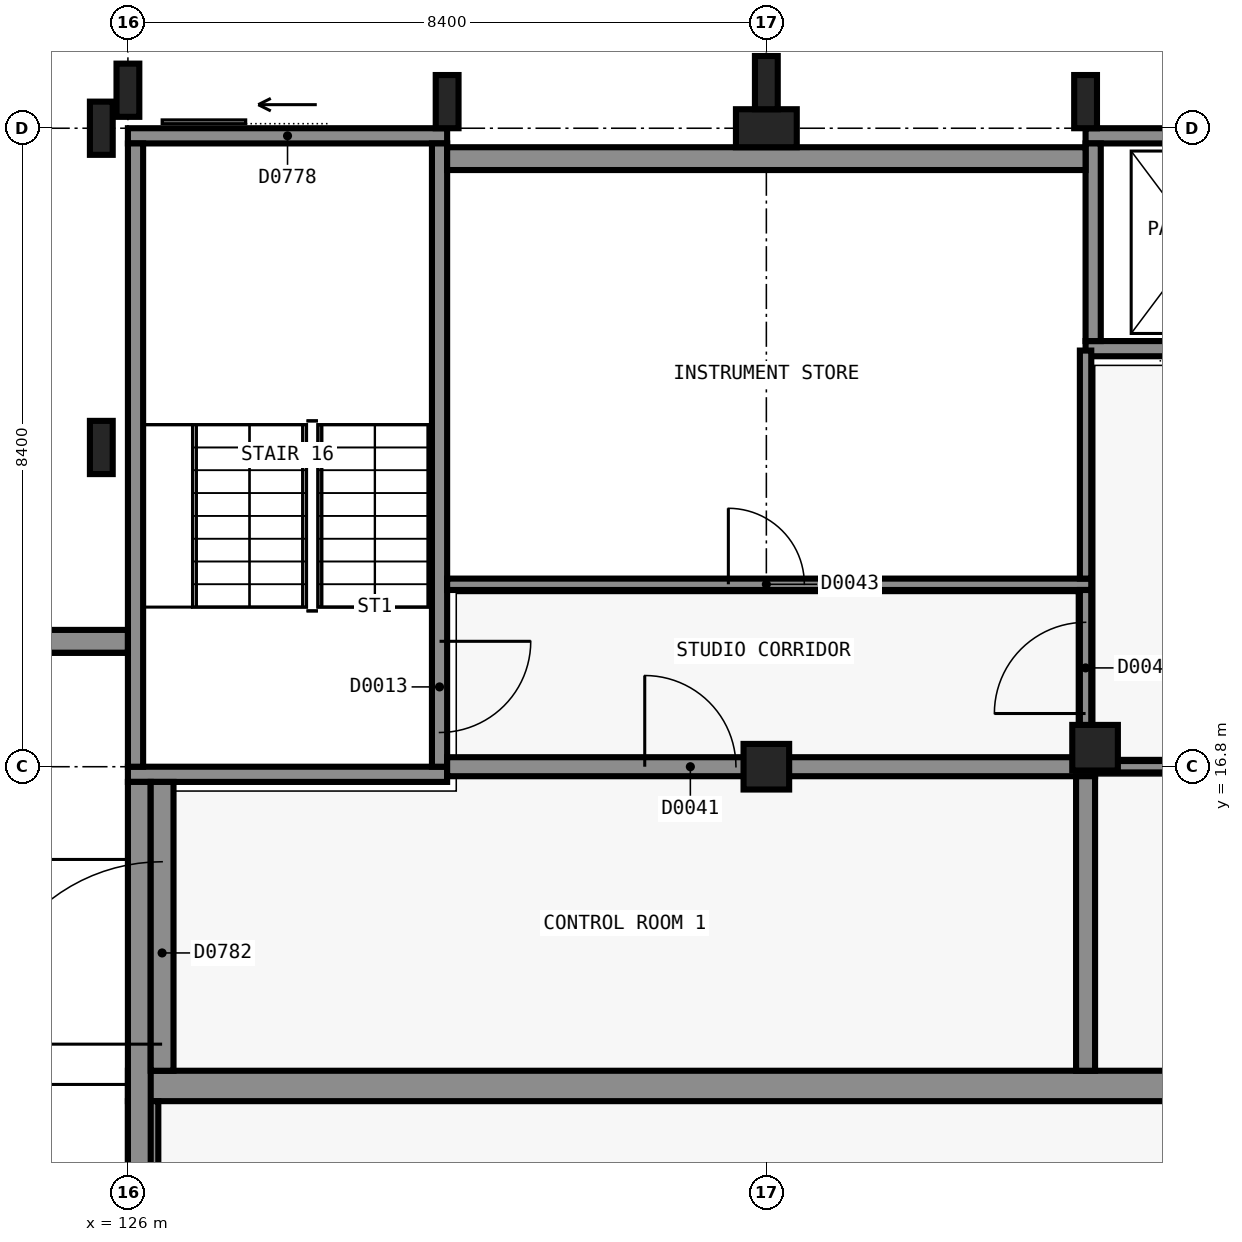
"""IFC4 building model, lengths in metres.
Left out: names, types, materials, properties, quantities, classifications, styles, units other than length and angle.
Written with IfcOpenShell. Run it as: python <this file> out.ifc"""

import sys

from ifc_helpers import new_model, si_unit, direction, frame, frame_2d, origin, origin_2d, place, context, subcontext, project, spatial, rectangle, extrude, element, fill, save


model = new_model("IFC4")
c1 = context("Model", 3, precision=1e-05, world=origin(), true_north=direction((0.0, 1.0)))
c2 = subcontext(c1, "Body", "Model", "MODEL_VIEW")
j1 = project(units=[si_unit("LENGTHUNIT", "METRE"), si_unit("PLANEANGLEUNIT", "RADIAN")], contexts=[c1])
p1 = place(None, origin())
s1 = spatial("IfcSite", under=j1, at=p1, CompositionType="ELEMENT")
p2 = place(p1, origin())
s2 = spatial("IfcBuilding", under=s1, at=p2, CompositionType="ELEMENT")
p3 = place(p2, origin())
s3 = spatial("IfcBuildingStorey", under=s2, at=p3, CompositionType="ELEMENT", Elevation=0.0)
p4 = place(p3, frame((130.2, 16.7, -0.3), z_axis=(0.0, 0.0, 1.0), x_axis=(-1.0, 0.0, 0.0)))
e1 = element("IfcWall", 1, at=p4, inside=s3, PredefinedType="SHEAR", context=c2, shape_type="SweptSolid", body=[
    extrude(rectangle(XDim=4.2, YDim=0.2, at=frame_2d((2.1, 0.0))), origin(), (0.0, 0.0, 1.0), 5.7),
])
p5 = place(p3, frame((126.0, 25.1, -0.3), z_axis=(0.0, 0.0, 1.0), x_axis=(1.0, 0.0, 0.0)))
e2 = element("IfcWall", 2, at=p5, inside=s3, PredefinedType="SHEAR", context=c2, shape_type="SweptSolid", body=[
    extrude(rectangle(XDim=4.2, YDim=0.2, at=frame_2d((2.1, 0.0))), origin(), (0.0, 0.0, 1.0), 5.7),
])
p6 = place(p5, frame((1.55, 0.0, 0.0)))
e3 = element("IfcOpeningElement", 3, at=p6, cuts=e2, PredefinedType="OPENING", context=c2, shape_type="SweptSolid", body=[
    extrude(rectangle(XDim=1.1, YDim=2.2, at=frame_2d((0.55, 1.1))), frame((0.0, 0.11, 0.0), z_axis=(0.0, -1.0, 0.0), x_axis=(1.0, 0.0, 0.0)), (0.0, 0.0, 1.0), 0.22),
])
p7 = place(p3, frame((126.1, 16.8, -0.3), z_axis=(0.0, 0.0, 1.0), x_axis=(0.0, 1.0, 0.0)))
e4 = element("IfcWall", 4, at=p7, inside=s3, PredefinedType="SHEAR", context=c2, shape_type="SweptSolid", body=[
    extrude(rectangle(XDim=8.2, YDim=0.2, at=frame_2d((4.1, 0.0))), origin(), (0.0, 0.0, 1.0), 5.7),
])
p8 = place(p3, frame((130.1, 25.0, -0.3), z_axis=(0.0, 0.0, 1.0), x_axis=(0.0, -1.0, 0.0)))
e5 = element("IfcWall", 5, at=p8, inside=s3, PredefinedType="SHEAR", context=c2, shape_type="SweptSolid", body=[
    extrude(rectangle(XDim=8.2, YDim=0.2, at=frame_2d((4.1, 0.0))), origin(), (0.0, 0.0, 1.0), 5.7),
])
p9 = place(p8, frame((6.55, 0.0, 0.3)))
e6 = element("IfcOpeningElement", 6, at=p9, cuts=e5, PredefinedType="OPENING", context=c2, shape_type="SweptSolid", body=[
    extrude(rectangle(XDim=1.2, YDim=2.1, at=frame_2d((0.6, 1.05))), frame((0.0, 0.11, 0.0), z_axis=(0.0, -1.0, 0.0), x_axis=(1.0, 0.0, 0.0)), (0.0, 0.0, 1.0), 0.22),
])
p10 = place(p3, frame((141.6, 22.3, -1.6), z_axis=(0.0, 0.0, 1.0), x_axis=(-1.0, 0.0, 0.0)))
e7 = element("IfcWall", 7, at=p10, inside=s3, PredefinedType="SHEAR", context=c2, shape_type="SweptSolid", body=[
    extrude(rectangle(XDim=3.0, YDim=0.2, at=frame_2d((1.5, 0.0))), origin(), (0.0, 0.0, 1.0), 7.0),
])
p11 = place(p10, frame((0.95, 0.0, 1.6)))
e8 = element("IfcOpeningElement", 8, at=p11, cuts=e7, PredefinedType="OPENING", context=c2, shape_type="SweptSolid", body=[
    extrude(rectangle(XDim=1.1, YDim=2.1, at=frame_2d((0.55, 1.05))), frame((0.0, 0.11, 0.0), z_axis=(0.0, -1.0, 0.0), x_axis=(1.0, 0.0, 0.0)), (0.0, 0.0, 1.0), 0.22),
])
p12 = place(p3, frame((138.6, 25.1, -1.6), z_axis=(0.0, 0.0, 1.0), x_axis=(1.0, 0.0, 0.0)))
e9 = element("IfcWall", 9, at=p12, inside=s3, PredefinedType="SHEAR", context=c2, shape_type="SweptSolid", body=[
    extrude(rectangle(XDim=3.0, YDim=0.2, at=frame_2d((1.5, 0.0))), origin(), (0.0, 0.0, 1.0), 7.0),
])
p13 = place(p3, frame((138.7, 22.4, -1.6), z_axis=(0.0, 0.0, 1.0), x_axis=(0.0, 1.0, 0.0)))
e10 = element("IfcWall", 10, at=p13, inside=s3, PredefinedType="SHEAR", context=c2, shape_type="SweptSolid", body=[
    extrude(rectangle(XDim=2.6, YDim=0.2, at=frame_2d((1.3, 0.0))), origin(), (0.0, 0.0, 1.0), 7.0),
])
p14 = place(p3, frame((126.0, 12.6, -0.3), z_axis=(0.0, 0.0, 1.0), x_axis=(1.0, 0.0, 0.0)))
e11 = element("IfcWall", 11, at=p14, inside=s3, PredefinedType="SHEAR", context=c2, shape_type="SweptSolid", body=[
    extrude(rectangle(XDim=17.0, YDim=0.4, at=frame_2d((8.5, 0.0))), origin(), (0.0, 0.0, 1.0), 5.7),
])
p15 = place(p14, frame((14.1, 0.0, 0.3)))
e12 = element("IfcOpeningElement", 12, at=p15, cuts=e11, PredefinedType="OPENING", context=c2, shape_type="SweptSolid", body=[
    extrude(rectangle(XDim=1.2, YDim=2.1, at=frame_2d((0.6, 1.05))), frame((0.0, 0.21, 0.0), z_axis=(0.0, -1.0, 0.0), x_axis=(1.0, 0.0, 0.0)), (0.0, 0.0, 1.0), 0.42),
])
p16 = place(p3, frame((126.2, 0.4, -0.3), z_axis=(0.0, 0.0, 1.0), x_axis=(0.0, 1.0, 0.0)))
e13 = element("IfcWall", 13, at=p16, inside=s3, PredefinedType="SHEAR", context=c2, shape_type="SweptSolid", body=[
    extrude(rectangle(XDim=12.0, YDim=0.4, at=frame_2d((6.0, 0.0))), origin(), (0.0, 0.0, 1.0), 5.7),
])
p17 = place(p3, frame((134.4, 16.8, -0.3), z_axis=(0.0, 0.0, 1.0), x_axis=(1.0, 0.0, 0.0)))
e14 = element("IfcColumn", 14, at=p17, inside=s3, PredefinedType="COLUMN", context=c2, shape_type="SweptSolid", body=[
    extrude(rectangle(XDim=0.6, YDim=0.6, at=origin_2d()), origin(), (0.0, 0.0, 1.0), 5.7),
])
p18 = place(p3, frame((134.4, 25.2, -0.3), z_axis=(0.0, 0.0, 1.0), x_axis=(1.0, 0.0, 0.0)))
e15 = element("IfcColumn", 15, at=p18, inside=s3, PredefinedType="COLUMN", context=c2, shape_type="SweptSolid", body=[
    extrude(rectangle(XDim=0.8, YDim=0.5, at=origin_2d()), origin(), (0.0, 0.0, 1.0), 5.7),
])
p19 = place(p3, frame((138.725, 17.05, -0.3), z_axis=(0.0, 0.0, 1.0), x_axis=(1.0, 0.0, 0.0)))
e16 = element("IfcColumn", 16, at=p19, inside=s3, PredefinedType="COLUMN", context=c2, shape_type="SweptSolid", body=[
    extrude(rectangle(XDim=0.6, YDim=0.6, at=origin_2d()), origin(), (0.0, 0.0, 1.0), 5.7),
])
p20 = place(p3, frame((125.999, 18.45, -1.2), z_axis=(0.0, 0.0, 1.0), x_axis=(-1.0, 0.0, 0.0)))
e17 = element("IfcWall", 17, at=p20, inside=s3, PredefinedType="SOLIDWALL", context=c2, shape_type="SweptSolid", body=[
    extrude(rectangle(XDim=6.499, YDim=0.3, at=frame_2d((3.25, 0.0))), origin(), (0.0, 0.0, 1.0), 0.9),
])
p21 = place(p3, frame((126.15, 10.3, -1.2), z_axis=(0.0, 0.0, 1.0), x_axis=(0.0, 1.0, 0.0)))
e18 = element("IfcWall", 18, at=p21, inside=s3, PredefinedType="SOLIDWALL", context=c2, shape_type="SweptSolid", body=[
    extrude(rectangle(XDim=6.3, YDim=0.3, at=frame_2d((3.15, 0.0))), origin(), (0.0, 0.0, 1.0), 0.9),
])
p22 = place(p3, frame((130.2, 24.8, 0.0), z_axis=(0.0, 0.0, 1.0), x_axis=(1.0, 0.0, 0.0)))
e19 = element("IfcWall", 19, at=p22, inside=s3, PredefinedType="SOLIDWALL", context=c2, shape_type="SweptSolid", body=[
    extrude(rectangle(XDim=8.4, YDim=0.3, at=frame_2d((4.2, 0.0))), origin(), (0.0, 0.0, 1.0), 5.1),
])
for number, where, z_axis, x_axis in (
    (20, (126.0, 25.7, -0.3), (0.0, 0.0, 1.0), (1.0, 0.0, 0.0)),
    (21, (130.2, 25.55, -0.3), (0.0, 0.0, 1.0), (1.0, 0.0, 0.0)),
    (22, (134.4, 25.8, -0.3), (0.0, 0.0, 1.0), (1.0, 0.0, 0.0)),
    (23, (138.6, 25.55, -0.3), (0.0, 0.0, 1.0), (1.0, 0.0, 0.0)),
):
    element("IfcColumn", number, at=place(p3, frame(where, z_axis=z_axis, x_axis=x_axis)), inside=s3, PredefinedType="PILASTER", context=c2, shape_type="SweptSolid", body=[
        extrude(rectangle(XDim=0.3, YDim=0.7, at=origin_2d()), origin(), (0.0, 0.0, 1.0), 5.7),
    ])
p23 = place(p3, frame((126.45, 12.8, 0.0), z_axis=(0.0, 0.0, 1.0), x_axis=(0.0, 1.0, 0.0)))
e24 = element("IfcWall", 24, at=p23, inside=s3, PredefinedType="SOLIDWALL", context=c2, shape_type="SweptSolid", body=[
    extrude(rectangle(XDim=3.8, YDim=0.3, at=frame_2d((1.9, 0.0))), origin(), (0.0, 0.0, 1.0), 5.1),
])
p24 = place(p23, frame((0.35, 0.0, 0.0)))
e25 = element("IfcOpeningElement", 25, at=p24, cuts=e24, PredefinedType="OPENING", context=c2, shape_type="SweptSolid", body=[
    extrude(rectangle(XDim=2.4, YDim=2.4, at=frame_2d((1.2, 1.2))), frame((0.0, 0.16, 0.0), z_axis=(0.0, -1.0, 0.0), x_axis=(1.0, 0.0, 0.0)), (0.0, 0.0, 1.0), 0.32),
])
for number, where, z_axis, x_axis in (
    (26, (125.65, 21.0, -0.3), (0.0, 0.0, 1.0), (0.0, 1.0, 0.0)),
    (27, (125.65, 25.2, -0.3), (0.0, 0.0, 1.0), (0.0, 1.0, 0.0)),
):
    element("IfcColumn", number, at=place(p3, frame(where, z_axis=z_axis, x_axis=x_axis)), inside=s3, PredefinedType="PILASTER", context=c2, shape_type="SweptSolid", body=[
        extrude(rectangle(XDim=0.3, YDim=0.7, at=origin_2d()), origin(), (0.0, 0.0, 1.0), 5.7),
    ])
p25 = place(p3, frame((130.2, 16.8, 0.0), z_axis=(0.0, 0.0, 1.0), x_axis=(1.0, 0.0, 0.0)))
e28 = element("IfcWall", 28, at=p25, inside=s3, PredefinedType="PARTITIONING", context=c2, shape_type="SweptSolid", body=[
    extrude(rectangle(XDim=8.525, YDim=0.25, at=frame_2d((4.263, 0.0))), origin(), (0.0, 0.0, 1.0), 4.4),
])
p26 = place(p25, frame((2.6, 0.0, 0.0)))
e29 = element("IfcOpeningElement", 29, at=p26, cuts=e28, PredefinedType="OPENING", context=c2, shape_type="SweptSolid", body=[
    extrude(rectangle(XDim=1.2, YDim=2.1, at=frame_2d((0.6, 1.05))), frame((0.0, 0.135, 0.0), z_axis=(0.0, -1.0, 0.0), x_axis=(1.0, 0.0, 0.0)), (0.0, 0.0, 1.0), 0.27),
])
p27 = place(p3, frame((138.6, 12.8, 0.0), z_axis=(0.0, 0.0, 1.0), x_axis=(0.0, 1.0, 0.0)))
e30 = element("IfcWall", 30, at=p27, inside=s3, PredefinedType="PARTITIONING", context=c2, shape_type="SweptSolid", body=[
    extrude(rectangle(XDim=3.875, YDim=0.25, at=frame_2d((1.938, 0.0))), origin(), (0.0, 0.0, 1.0), 4.4),
])
p28 = place(p3, frame((130.2, 19.2, 0.0), z_axis=(0.0, 0.0, 1.0), x_axis=(1.0, 0.0, 0.0)))
e31 = element("IfcWall", 31, at=p28, inside=s3, PredefinedType="PARTITIONING", context=c2, shape_type="SweptSolid", body=[
    extrude(rectangle(XDim=8.475, YDim=0.15, at=frame_2d((4.237, 0.0))), origin(), (0.0, 0.0, 1.0), 4.4),
])
p29 = place(p28, frame((3.7, 0.0, 0.0)))
e32 = element("IfcOpeningElement", 32, at=p29, cuts=e31, PredefinedType="OPENING", context=c2, shape_type="SweptSolid", body=[
    extrude(rectangle(XDim=1.0, YDim=2.1, at=frame_2d((0.5, 1.05))), frame((0.0, 0.085, 0.0), z_axis=(0.0, -1.0, 0.0), x_axis=(1.0, 0.0, 0.0)), (0.0, 0.0, 1.0), 0.17),
])
p30 = place(p3, frame((138.725, 16.8, 0.0), z_axis=(0.0, 0.0, 1.0), x_axis=(1.0, 0.0, 0.0)))
e33 = element("IfcWall", 33, at=p30, inside=s3, PredefinedType="SOLIDWALL", context=c2, shape_type="SweptSolid", body=[
    extrude(rectangle(XDim=6.95, YDim=0.15, at=frame_2d((3.475, 0.0))), origin(), (0.0, 0.0, 1.0), 4.4),
])
p31 = place(p30, frame((2.475, 0.0, 0.0)))
e34 = element("IfcOpeningElement", 34, at=p31, cuts=e33, PredefinedType="OPENING", context=c2, shape_type="SweptSolid", body=[
    extrude(rectangle(XDim=1.2, YDim=2.1, at=frame_2d((0.6, 1.05))), frame((0.0, 0.085, 0.0), z_axis=(0.0, -1.0, 0.0), x_axis=(1.0, 0.0, 0.0)), (0.0, 0.0, 1.0), 0.17),
])
p32 = place(p3, frame((138.6, 16.925, 0.0), z_axis=(0.0, 0.0, 1.0), x_axis=(0.0, 1.0, 0.0)))
e35 = element("IfcWall", 35, at=p32, inside=s3, PredefinedType="SOLIDWALL", context=c2, shape_type="SweptSolid", body=[
    extrude(rectangle(XDim=2.2, YDim=0.15, at=frame_2d((1.1, 0.0))), origin(), (0.0, 0.0, 1.0), 4.4),
])
p33 = place(p32, frame((0.575, 0.0, 0.0)))
e36 = element("IfcOpeningElement", 36, at=p33, cuts=e35, PredefinedType="OPENING", context=c2, shape_type="SweptSolid", body=[
    extrude(rectangle(XDim=1.2, YDim=2.1, at=frame_2d((0.6, 1.05))), frame((0.0, 0.085, 0.0), z_axis=(0.0, -1.0, 0.0), x_axis=(1.0, 0.0, 0.0)), (0.0, 0.0, 1.0), 0.17),
])
p34 = place(p3, frame((138.6, 19.275, 0.0), z_axis=(0.0, 0.0, 1.0), x_axis=(0.0, 1.0, 0.0)))
e37 = element("IfcWall", 37, at=p34, inside=s3, PredefinedType="SOLIDWALL", context=c2, shape_type="SweptSolid", body=[
    extrude(rectangle(XDim=3.0, YDim=0.15, at=frame_2d((1.5, 0.0))), origin(), (0.0, 0.0, 1.0), 5.1),
])
p35 = place(p6, origin())
e38 = element("IfcDoor", 38, at=p35, inside=s3, OperationType="SLIDING_TO_LEFT", PredefinedType="DOOR", context=c2, shape_type="SweptSolid", body=[
    extrude(rectangle(XDim=1.1, YDim=2.2, at=frame_2d((0.55, 1.1))), frame((0.0, 0.025, 0.0), z_axis=(0.0, -1.0, 0.0), x_axis=(1.0, 0.0, 0.0)), (0.0, 0.0, 1.0), 0.05),
])
fill(e3, e38)
p36 = place(p24, origin())
e39 = element("IfcDoor", 39, at=p36, inside=s3, OperationType="DOUBLE_DOOR_DOUBLE_SWING", PredefinedType="DOOR", context=c2, shape_type="SweptSolid", body=[
    extrude(rectangle(XDim=2.4, YDim=2.4, at=frame_2d((1.2, 1.2))), frame((0.0, 0.025, 0.0), z_axis=(0.0, -1.0, 0.0), x_axis=(1.0, 0.0, 0.0)), (0.0, 0.0, 1.0), 0.05),
])
fill(e25, e39)
p37 = place(p11, origin())
e40 = element("IfcDoor", 40, at=p37, inside=s3, OperationType="SLIDING_TO_LEFT", PredefinedType="DOOR", context=c2, shape_type="SweptSolid", body=[
    extrude(rectangle(XDim=1.1, YDim=2.1, at=frame_2d((0.55, 1.05))), frame((0.0, 0.025, 0.0), z_axis=(0.0, -1.0, 0.0), x_axis=(1.0, 0.0, 0.0)), (0.0, 0.0, 1.0), 0.05),
])
fill(e8, e40)
p38 = place(p9, origin())
e41 = element("IfcDoor", 41, at=p38, inside=s3, OperationType="SINGLE_SWING_LEFT", PredefinedType="DOOR", context=c2, shape_type="SweptSolid", body=[
    extrude(rectangle(XDim=1.2, YDim=2.1, at=frame_2d((0.6, 1.05))), frame((0.0, 0.025, 0.0), z_axis=(0.0, -1.0, 0.0), x_axis=(1.0, 0.0, 0.0)), (0.0, 0.0, 1.0), 0.05),
])
fill(e6, e41)
p39 = place(p26, origin())
e42 = element("IfcDoor", 42, at=p39, inside=s3, OperationType="SINGLE_SWING_LEFT", PredefinedType="DOOR", context=c2, shape_type="SweptSolid", body=[
    extrude(rectangle(XDim=1.2, YDim=2.1, at=frame_2d((0.6, 1.05))), frame((0.0, 0.025, 0.0), z_axis=(0.0, -1.0, 0.0), x_axis=(1.0, 0.0, 0.0)), (0.0, 0.0, 1.0), 0.05),
])
fill(e29, e42)
p40 = place(p33, origin())
e43 = element("IfcDoor", 43, at=p40, inside=s3, OperationType="SINGLE_SWING_RIGHT", PredefinedType="DOOR", context=c2, shape_type="SweptSolid", body=[
    extrude(rectangle(XDim=1.2, YDim=2.1, at=frame_2d((0.6, 1.05))), frame((0.0, 0.025, 0.0), z_axis=(0.0, -1.0, 0.0), x_axis=(1.0, 0.0, 0.0)), (0.0, 0.0, 1.0), 0.05),
])
fill(e36, e43)
p41 = place(p29, origin())
e44 = element("IfcDoor", 44, at=p41, inside=s3, OperationType="SINGLE_SWING_LEFT", PredefinedType="DOOR", context=c2, shape_type="SweptSolid", body=[
    extrude(rectangle(XDim=1.0, YDim=2.1, at=frame_2d((0.5, 1.05))), frame((0.0, 0.025, 0.0), z_axis=(0.0, -1.0, 0.0), x_axis=(1.0, 0.0, 0.0)), (0.0, 0.0, 1.0), 0.05),
])
fill(e32, e44)
save(model, sys.argv[1])
